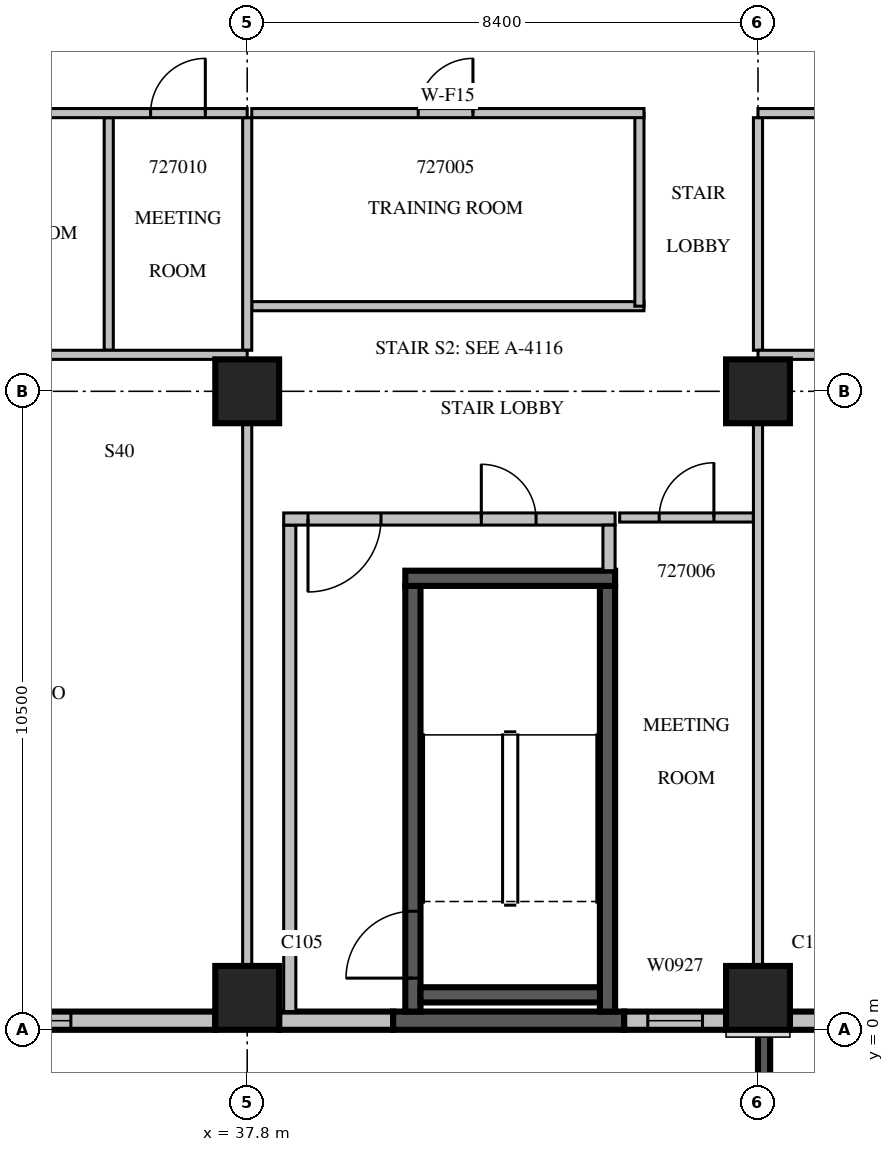
"""IFC4 building model, lengths in metres.
Left out: names, types, materials, properties, quantities, classifications, styles, units other than length and angle.
Written with IfcOpenShell. Run it as: python <this file> out.ifc"""

import sys

from ifc_helpers import new_model, si_unit, direction, frame, frame_2d, origin, origin_2d, place, context, subcontext, project, spatial, rectangle, extrude, source, transform, mapped, element, fill, save


model = new_model("IFC4")
c1 = context("Model", 3, precision=1e-05, world=origin(), true_north=direction((0.0, 1.0)))
c2 = subcontext(c1, "Body", "Model", "MODEL_VIEW")
j1 = project(units=[si_unit("LENGTHUNIT", "METRE"), si_unit("PLANEANGLEUNIT", "RADIAN")], contexts=[c1])
p1 = place(None, origin())
s1 = spatial("IfcSite", under=j1, at=p1, CompositionType="ELEMENT")
p2 = place(p1, origin())
s2 = spatial("IfcBuilding", under=s1, at=p2, CompositionType="ELEMENT")
p3 = place(p2, frame((0.0, 0.0, 124.5)))
s3 = spatial("IfcBuildingStorey", under=s2, at=p3, CompositionType="ELEMENT", Elevation=124.5)
m1 = source(origin(), c2, "Body", "SweptSolid", [
    extrude(rectangle(XDim=1.05, YDim=1.05, at=origin_2d()), origin(), (0.0, 0.0, 1.0), 4.2),
])
for number, where, z_axis, x_axis in (
    (1, (37.8, 0.525, 0.0), (0.0, 0.0, 1.0), (1.0, 0.0, 0.0)),
    (2, (46.2, 0.525, 0.0), (0.0, 0.0, 1.0), (1.0, 0.0, 0.0)),
    (3, (37.8, 10.5, 0.0), (0.0, 0.0, 1.0), (1.0, 0.0, 0.0)),
    (4, (46.2, 10.5, 0.0), (0.0, 0.0, 1.0), (1.0, 0.0, 0.0)),
):
    element("IfcColumn", number, at=place(p3, frame(where, z_axis=z_axis, x_axis=x_axis)), inside=s3, PredefinedType="COLUMN", context=c2, shape_type="MappedRepresentation", body=[
        mapped(m1, transform((0.0, 0.0, 0.0), scale=1.0)),
    ])
m2 = source(origin(), c2, "Body", "SweptSolid", [
    extrude(rectangle(XDim=3.9, YDim=0.2, at=frame_2d((1.95, 0.0))), origin(), (0.0, 0.0, 1.0), 3.8),
])
p4 = place(p3, frame((46.3, 0.0, 0.0), z_axis=(0.0, 0.0, 1.0), x_axis=(0.0, -1.0, 0.0)))
e5 = element("IfcWall", 5, at=p4, inside=s3, PredefinedType="SOLIDWALL", context=c2, shape_type="MappedRepresentation", body=[
    mapped(m2, transform((0.0, 0.0, 0.0), scale=1.0)),
])
m3 = source(origin(), c2, "Body", "SweptSolid", [
    extrude(rectangle(XDim=2.4, YDim=2.7, at=frame_2d((1.2, 1.35))), frame((0.0, 0.11, 0.0), z_axis=(0.0, -1.0, 0.0), x_axis=(1.0, 0.0, 0.0)), (0.0, 0.0, 1.0), 0.22),
])
p5 = place(p4, frame((0.75, 0.0, 0.6)))
e6 = element("IfcOpeningElement", 6, at=p5, cuts=e5, PredefinedType="OPENING", context=c2, shape_type="MappedRepresentation", body=[
    mapped(m3, transform((0.0, 0.0, 0.0), scale=1.0)),
])
m4 = source(origin(), c2, "Body", "SweptSolid", [
    extrude(rectangle(XDim=7.35, YDim=0.3, at=frame_2d((3.675, 0.0))), origin(), (0.0, 0.0, 1.0), 3.8),
])
p6 = place(p3, frame((29.925, 0.15, 0.0), z_axis=(0.0, 0.0, 1.0), x_axis=(1.0, 0.0, 0.0)))
e7 = element("IfcWall", 7, at=p6, inside=s3, PredefinedType="STANDARD", context=c2, shape_type="MappedRepresentation", body=[
    mapped(m4, transform((0.0, 0.0, 0.0), scale=1.0)),
])
m5 = source(origin(), c2, "Body", "SweptSolid", [
    extrude(rectangle(XDim=2.4, YDim=2.7, at=frame_2d((1.2, 1.35))), frame((0.0, 0.16, 0.0), z_axis=(0.0, -1.0, 0.0), x_axis=(1.0, 0.0, 0.0)), (0.0, 0.0, 1.0), 0.32),
])
p7 = place(p6, frame((2.575, 0.0, 0.6)))
e8 = element("IfcOpeningElement", 8, at=p7, cuts=e7, PredefinedType="OPENING", context=c2, shape_type="MappedRepresentation", body=[
    mapped(m5, transform((0.0, 0.0, 0.0), scale=1.0)),
])
m6 = source(origin(), c2, "Body", "SweptSolid", [
    extrude(rectangle(XDim=1.875, YDim=0.3, at=frame_2d((0.938, 0.0))), origin(), (0.0, 0.0, 1.0), 3.8),
])
p8 = place(p3, frame((38.325, 0.15, 0.0), z_axis=(0.0, 0.0, 1.0), x_axis=(1.0, 0.0, 0.0)))
e9 = element("IfcWall", 9, at=p8, inside=s3, PredefinedType="STANDARD", context=c2, shape_type="MappedRepresentation", body=[
    mapped(m6, transform((0.0, 0.0, 0.0), scale=1.0)),
])
m7 = source(origin(), c2, "Body", "SweptSolid", [
    extrude(rectangle(XDim=3.8, YDim=0.3, at=frame_2d((1.9, 0.0))), origin(), (0.0, 0.0, 1.0), 3.8),
])
p9 = place(p3, frame((40.2, 0.15, 0.0), z_axis=(0.0, 0.0, 1.0), x_axis=(1.0, 0.0, 0.0)))
e10 = element("IfcWall", 10, at=p9, inside=s3, PredefinedType="SOLIDWALL", context=c2, shape_type="MappedRepresentation", body=[
    mapped(m7, transform((0.0, 0.0, 0.0), scale=1.0)),
])
m8 = source(origin(), c2, "Body", "SweptSolid", [
    extrude(rectangle(XDim=1.675, YDim=0.3, at=frame_2d((0.838, 0.0))), origin(), (0.0, 0.0, 1.0), 3.8),
])
p10 = place(p3, frame((44.0, 0.15, 0.0), z_axis=(0.0, 0.0, 1.0), x_axis=(1.0, 0.0, 0.0)))
e11 = element("IfcWall", 11, at=p10, inside=s3, PredefinedType="STANDARD", context=c2, shape_type="MappedRepresentation", body=[
    mapped(m8, transform((0.0, 0.0, 0.0), scale=1.0)),
])
m9 = source(origin(), c2, "Body", "SweptSolid", [
    extrude(rectangle(XDim=0.9, YDim=2.7, at=frame_2d((0.45, 1.35))), frame((0.0, 0.16, 0.0), z_axis=(0.0, -1.0, 0.0), x_axis=(1.0, 0.0, 0.0)), (0.0, 0.0, 1.0), 0.32),
])
p11 = place(p10, frame((0.388, 0.0, 0.6)))
e12 = element("IfcOpeningElement", 12, at=p11, cuts=e11, PredefinedType="OPENING", context=c2, shape_type="MappedRepresentation", body=[
    mapped(m9, transform((0.0, 0.0, 0.0), scale=1.0)),
])
m10 = source(origin(), c2, "Body", "SweptSolid", [
    extrude(rectangle(XDim=4.83, YDim=0.3, at=frame_2d((2.415, 0.0))), origin(), (0.0, 0.0, 1.0), 3.8),
])
p12 = place(p3, frame((46.725, 0.15, 0.0), z_axis=(0.0, 0.0, 1.0), x_axis=(1.0, 0.0, 0.0)))
e13 = element("IfcWall", 13, at=p12, inside=s3, PredefinedType="STANDARD", context=c2, shape_type="MappedRepresentation", body=[
    mapped(m10, transform((0.0, 0.0, 0.0), scale=1.0)),
])
m11 = source(origin(), c2, "Body", "SweptSolid", [
    extrude(rectangle(XDim=1.0, YDim=2.1, at=frame_2d((0.5, 1.05))), frame((0.0, 0.16, 0.0), z_axis=(0.0, -1.0, 0.0), x_axis=(1.0, 0.0, 0.0)), (0.0, 0.0, 1.0), 0.32),
])
p13 = place(p12, frame((1.915, 0.0, 0.0)))
e14 = element("IfcOpeningElement", 14, at=p13, cuts=e13, PredefinedType="OPENING", context=c2, shape_type="MappedRepresentation", body=[
    mapped(m11, transform((0.0, 0.0, 0.0), scale=1.0)),
])
m12 = source(origin(), c2, "Body", "SweptSolid", [
    extrude(rectangle(XDim=7.0, YDim=0.25, at=frame_2d((3.5, 0.0))), origin(), (0.0, 0.0, 1.0), 3.8),
])
p14 = place(p3, frame((40.525, 0.3, 0.0), z_axis=(0.0, 0.0, 1.0), x_axis=(0.0, 1.0, 0.0)))
e15 = element("IfcWall", 15, at=p14, inside=s3, PredefinedType="SOLIDWALL", context=c2, shape_type="MappedRepresentation", body=[
    mapped(m12, transform((0.0, 0.0, 0.0), scale=1.0)),
])
m13 = source(origin(), c2, "Body", "SweptSolid", [
    extrude(rectangle(XDim=1.1, YDim=2.1, at=frame_2d((0.55, 1.05))), frame((0.0, 0.135, 0.0), z_axis=(0.0, -1.0, 0.0), x_axis=(1.0, 0.0, 0.0)), (0.0, 0.0, 1.0), 0.27),
])
p15 = place(p14, frame((0.55, 0.0, 0.0)))
e16 = element("IfcOpeningElement", 16, at=p15, cuts=e15, PredefinedType="OPENING", context=c2, shape_type="MappedRepresentation", body=[
    mapped(m13, transform((0.0, 0.0, 0.0), scale=1.0)),
])
p16 = place(p3, frame((43.725, 0.3, 0.0), z_axis=(0.0, 0.0, 1.0), x_axis=(0.0, 1.0, 0.0)))
e17 = element("IfcWall", 17, at=p16, inside=s3, PredefinedType="SOLIDWALL", context=c2, shape_type="MappedRepresentation", body=[
    mapped(m12, transform((0.0, 0.0, 0.0), scale=1.0)),
])
m14 = source(origin(), c2, "Body", "SweptSolid", [
    extrude(rectangle(XDim=3.45, YDim=0.25, at=frame_2d((1.725, 0.0))), origin(), (0.0, 0.0, 1.0), 3.8),
])
p17 = place(p3, frame((40.4, 7.425, 0.0), z_axis=(0.0, 0.0, 1.0), x_axis=(1.0, 0.0, 0.0)))
e18 = element("IfcWall", 18, at=p17, inside=s3, PredefinedType="SOLIDWALL", context=c2, shape_type="MappedRepresentation", body=[
    mapped(m14, transform((0.0, 0.0, 0.0), scale=1.0)),
])
m15 = source(origin(), c2, "Body", "SweptSolid", [
    extrude(rectangle(XDim=2.95, YDim=0.25, at=frame_2d((1.475, 0.0))), origin(), (0.0, 0.0, 1.0), 3.8),
])
p18 = place(p3, frame((40.65, 0.575, 0.0), z_axis=(0.0, 0.0, 1.0), x_axis=(1.0, 0.0, 0.0)))
e19 = element("IfcWall", 19, at=p18, inside=s3, PredefinedType="SOLIDWALL", context=c2, shape_type="MappedRepresentation", body=[
    mapped(m15, transform((0.0, 0.0, 0.0), scale=1.0)),
])
m16 = source(origin(), c2, "Body", "SweptSolid", [
    extrude(rectangle(XDim=8.0, YDim=0.2, at=frame_2d((4.0, 0.0))), origin(), (0.0, 0.0, 1.0), 3.8),
])
p19 = place(p3, frame((38.5, 0.3, 0.0), z_axis=(0.0, 0.0, 1.0), x_axis=(0.0, 1.0, 0.0)))
e20 = element("IfcWall", 20, at=p19, inside=s3, PredefinedType="PARTITIONING", context=c2, shape_type="MappedRepresentation", body=[
    mapped(m16, transform((0.0, 0.0, 0.0), scale=1.0)),
])
m17 = source(origin(), c2, "Body", "SweptSolid", [
    extrude(rectangle(XDim=5.45, YDim=0.2, at=frame_2d((2.725, 0.0))), origin(), (0.0, 0.0, 1.0), 3.8),
])
p20 = place(p3, frame((38.4, 8.4, 0.0), z_axis=(0.0, 0.0, 1.0), x_axis=(1.0, 0.0, 0.0)))
e21 = element("IfcWall", 21, at=p20, inside=s3, PredefinedType="PARTITIONING", context=c2, shape_type="MappedRepresentation", body=[
    mapped(m17, transform((0.0, 0.0, 0.0), scale=1.0)),
])
m18 = source(origin(), c2, "Body", "SweptSolid", [
    extrude(rectangle(XDim=1.2, YDim=2.1, at=frame_2d((0.6, 1.05))), frame((0.0, 0.11, 0.0), z_axis=(0.0, -1.0, 0.0), x_axis=(1.0, 0.0, 0.0)), (0.0, 0.0, 1.0), 0.22),
])
p21 = place(p20, frame((0.4, 0.0, 0.0)))
e22 = element("IfcOpeningElement", 22, at=p21, cuts=e21, PredefinedType="OPENING", context=c2, shape_type="MappedRepresentation", body=[
    mapped(m18, transform((0.0, 0.0, 0.0), scale=1.0)),
])
m19 = source(origin(), c2, "Body", "SweptSolid", [
    extrude(rectangle(XDim=0.9, YDim=2.1, at=frame_2d((0.45, 1.05))), frame((0.0, 0.11, 0.0), z_axis=(0.0, -1.0, 0.0), x_axis=(1.0, 0.0, 0.0)), (0.0, 0.0, 1.0), 0.22),
])
p22 = place(p20, frame((3.25, 0.0, 0.0)))
e23 = element("IfcOpeningElement", 23, at=p22, cuts=e21, PredefinedType="OPENING", context=c2, shape_type="MappedRepresentation", body=[
    mapped(m19, transform((0.0, 0.0, 0.0), scale=1.0)),
])
m20 = source(origin(), c2, "Body", "SweptSolid", [
    extrude(rectangle(XDim=0.75, YDim=0.2, at=frame_2d((0.375, 0.0))), origin(), (0.0, 0.0, 1.0), 3.8),
])
p23 = place(p3, frame((43.75, 7.55, 0.0), z_axis=(0.0, 0.0, 1.0), x_axis=(0.0, 1.0, 0.0)))
e24 = element("IfcWall", 24, at=p23, inside=s3, PredefinedType="PARTITIONING", context=c2, shape_type="MappedRepresentation", body=[
    mapped(m20, transform((0.0, 0.0, 0.0), scale=1.0)),
])
m21 = source(origin(), c2, "Body", "SweptSolid", [
    extrude(rectangle(XDim=6.45, YDim=0.15, at=frame_2d((3.225, 0.0))), origin(), (0.0, 0.0, 1.0), 3.8),
])
p24 = place(p3, frame((37.875, 11.9, 0.0), z_axis=(0.0, 0.0, 1.0), x_axis=(1.0, 0.0, 0.0)))
e25 = element("IfcWall", 25, at=p24, inside=s3, PredefinedType="PARTITIONING", context=c2, shape_type="MappedRepresentation", body=[
    mapped(m21, transform((0.0, 0.0, 0.0), scale=1.0)),
])
m22 = source(origin(), c2, "Body", "SweptSolid", [
    extrude(rectangle(XDim=3.175, YDim=0.15, at=frame_2d((1.587, 0.0))), origin(), (0.0, 0.0, 1.0), 3.8),
])
p25 = place(p3, frame((44.25, 11.9, 0.0), z_axis=(0.0, 0.0, 1.0), x_axis=(0.0, 1.0, 0.0)))
e26 = element("IfcWall", 26, at=p25, inside=s3, PredefinedType="PARTITIONING", context=c2, shape_type="MappedRepresentation", body=[
    mapped(m22, transform((0.0, 0.0, 0.0), scale=1.0)),
])
p26 = place(p3, frame((44.325, 15.075, 0.0), z_axis=(0.0, 0.0, 1.0), x_axis=(-1.0, 0.0, 0.0)))
e27 = element("IfcWall", 27, at=p26, inside=s3, PredefinedType="PARTITIONING", context=c2, shape_type="MappedRepresentation", body=[
    mapped(m21, transform((0.0, 0.0, 0.0), scale=1.0)),
])
m23 = source(origin(), c2, "Body", "SweptSolid", [
    extrude(rectangle(XDim=0.9, YDim=2.1, at=frame_2d((0.45, 1.05))), frame((0.0, 0.085, 0.0), z_axis=(0.0, -1.0, 0.0), x_axis=(1.0, 0.0, 0.0)), (0.0, 0.0, 1.0), 0.17),
])
p27 = place(p26, frame((2.812, 0.0, 0.0)))
e28 = element("IfcOpeningElement", 28, at=p27, cuts=e27, PredefinedType="OPENING", context=c2, shape_type="MappedRepresentation", body=[
    mapped(m23, transform((0.0, 0.0, 0.0), scale=1.0)),
])
m24 = source(origin(), c2, "Body", "SweptSolid", [
    extrude(rectangle(XDim=2.2, YDim=0.15, at=frame_2d((1.1, 0.0))), origin(), (0.0, 0.0, 1.0), 3.8),
])
p28 = place(p3, frame((46.125, 8.425, 0.0), z_axis=(0.0, 0.0, 1.0), x_axis=(-1.0, 0.0, 0.0)))
e29 = element("IfcWall", 29, at=p28, inside=s3, PredefinedType="PARTITIONING", context=c2, shape_type="MappedRepresentation", body=[
    mapped(m24, transform((0.0, 0.0, 0.0), scale=1.0)),
])
p29 = place(p28, frame((0.65, 0.0, 0.0)))
e30 = element("IfcOpeningElement", 30, at=p29, cuts=e29, PredefinedType="OPENING", context=c2, shape_type="MappedRepresentation", body=[
    mapped(m23, transform((0.0, 0.0, 0.0), scale=1.0)),
])
m25 = source(origin(), c2, "Body", "SweptSolid", [
    extrude(rectangle(XDim=3.825, YDim=0.15, at=frame_2d((1.913, 0.0))), origin(), (0.0, 0.0, 1.0), 3.8),
])
p30 = place(p3, frame((35.523, 11.175, 0.0), z_axis=(0.0, 0.0, 1.0), x_axis=(0.0, 1.0, 0.0)))
e31 = element("IfcWall", 31, at=p30, inside=s3, PredefinedType="PARTITIONING", context=c2, shape_type="MappedRepresentation", body=[
    mapped(m25, transform((0.0, 0.0, 0.0), scale=1.0)),
])
m26 = source(origin(), c2, "Body", "SweptSolid", [
    extrude(rectangle(XDim=8.927, YDim=0.15, at=frame_2d((4.463, 0.0))), origin(), (0.0, 0.0, 1.0), 3.8),
])
p31 = place(p3, frame((37.8, 1.049, 0.0), z_axis=(0.0, 0.0, 1.0), x_axis=(0.0, 1.0, 0.0)))
e32 = element("IfcWall", 32, at=p31, inside=s3, PredefinedType="PARTITIONING", context=c2, shape_type="MappedRepresentation", body=[
    mapped(m26, transform((0.0, 0.0, 0.0), scale=1.0)),
])
p32 = place(p3, frame((37.8, 11.175, 0.0), z_axis=(0.0, 0.0, 1.0), x_axis=(0.0, 1.0, 0.0)))
e33 = element("IfcWall", 33, at=p32, inside=s3, PredefinedType="PARTITIONING", context=c2, shape_type="MappedRepresentation", body=[
    mapped(m25, transform((0.0, 0.0, 0.0), scale=1.0)),
])
m27 = source(origin(), c2, "Body", "SweptSolid", [
    extrude(rectangle(XDim=8.4, YDim=0.15, at=frame_2d((4.2, 0.0))), origin(), (0.0, 0.0, 1.0), 3.8),
])
p33 = place(p3, frame((37.8, 11.1, 0.0), z_axis=(0.0, 0.0, 1.0), x_axis=(-1.0, 0.0, 0.0)))
e34 = element("IfcWall", 34, at=p33, inside=s3, PredefinedType="PARTITIONING", context=c2, shape_type="MappedRepresentation", body=[
    mapped(m27, transform((0.0, 0.0, 0.0), scale=1.0)),
])
m28 = source(origin(), c2, "Body", "SweptSolid", [
    extrude(rectangle(XDim=1.1, YDim=2.1, at=frame_2d((0.55, 1.05))), frame((0.0, 0.085, 0.0), z_axis=(0.0, -1.0, 0.0), x_axis=(1.0, 0.0, 0.0)), (0.0, 0.0, 1.0), 0.17),
])
p34 = place(p33, frame((5.999, 0.0, 0.0)))
e35 = element("IfcOpeningElement", 35, at=p34, cuts=e34, PredefinedType="OPENING", context=c2, shape_type="MappedRepresentation", body=[
    mapped(m28, transform((0.0, 0.0, 0.0), scale=1.0)),
])
p35 = place(p3, frame((46.2, 1.049, 0.0), z_axis=(0.0, 0.0, 1.0), x_axis=(0.0, 1.0, 0.0)))
e36 = element("IfcWall", 36, at=p35, inside=s3, PredefinedType="PARTITIONING", context=c2, shape_type="MappedRepresentation", body=[
    mapped(m26, transform((0.0, 0.0, 0.0), scale=1.0)),
])
p36 = place(p3, frame((46.2, 11.175, 0.0), z_axis=(0.0, 0.0, 1.0), x_axis=(0.0, 1.0, 0.0)))
e37 = element("IfcWall", 37, at=p36, inside=s3, PredefinedType="PARTITIONING", context=c2, shape_type="MappedRepresentation", body=[
    mapped(m25, transform((0.0, 0.0, 0.0), scale=1.0)),
])
m29 = source(origin(), c2, "Body", "SweptSolid", [
    extrude(rectangle(XDim=24.9, YDim=0.15, at=frame_2d((12.45, 0.0))), origin(), (0.0, 0.0, 1.0), 3.8),
])
p37 = place(p3, frame((71.1, 11.1, 0.0), z_axis=(0.0, 0.0, 1.0), x_axis=(-1.0, 0.0, 0.0)))
e38 = element("IfcWall", 38, at=p37, inside=s3, PredefinedType="PARTITIONING", context=c2, shape_type="MappedRepresentation", body=[
    mapped(m29, transform((0.0, 0.0, 0.0), scale=1.0)),
])
p38 = place(p37, frame((21.51, 0.0, 0.0)))
e39 = element("IfcOpeningElement", 39, at=p38, cuts=e38, PredefinedType="OPENING", context=c2, shape_type="MappedRepresentation", body=[
    mapped(m23, transform((0.0, 0.0, 0.0), scale=1.0)),
])
p39 = place(p37, frame((15.63, 0.0, 0.0)))
e40 = element("IfcOpeningElement", 40, at=p39, cuts=e38, PredefinedType="OPENING", context=c2, shape_type="MappedRepresentation", body=[
    mapped(m23, transform((0.0, 0.0, 0.0), scale=1.0)),
])
p40 = place(p37, frame((9.75, 0.0, 0.0)))
e41 = element("IfcOpeningElement", 41, at=p40, cuts=e38, PredefinedType="OPENING", context=c2, shape_type="MappedRepresentation", body=[
    mapped(m23, transform((0.0, 0.0, 0.0), scale=1.0)),
])
p41 = place(p37, frame((4.645, 0.0, 0.0)))
e42 = element("IfcOpeningElement", 42, at=p41, cuts=e38, PredefinedType="OPENING", context=c2, shape_type="MappedRepresentation", body=[
    mapped(m23, transform((0.0, 0.0, 0.0), scale=1.0)),
])
p42 = place(p37, frame((2.105, 0.0, 0.0)))
e43 = element("IfcOpeningElement", 43, at=p42, cuts=e38, PredefinedType="OPENING", context=c2, shape_type="MappedRepresentation", body=[
    mapped(m28, transform((0.0, 0.0, 0.0), scale=1.0)),
])
p43 = place(p3, frame((37.8, 15.075, 0.0), z_axis=(0.0, 0.0, 1.0), x_axis=(-1.0, 0.0, 0.0)))
e44 = element("IfcWall", 44, at=p43, inside=s3, PredefinedType="PARTITIONING", context=c2, shape_type="MappedRepresentation", body=[
    mapped(m27, transform((0.0, 0.0, 0.0), scale=1.0)),
])
p44 = place(p43, frame((6.274, 0.0, 0.0)))
e45 = element("IfcOpeningElement", 45, at=p44, cuts=e44, PredefinedType="OPENING", context=c2, shape_type="MappedRepresentation", body=[
    mapped(m28, transform((0.0, 0.0, 0.0), scale=1.0)),
])
p45 = place(p43, frame((3.313, 0.0, 0.0)))
e46 = element("IfcOpeningElement", 46, at=p45, cuts=e44, PredefinedType="OPENING", context=c2, shape_type="MappedRepresentation", body=[
    mapped(m23, transform((0.0, 0.0, 0.0), scale=1.0)),
])
p46 = place(p43, frame((0.689, 0.0, 0.0)))
e47 = element("IfcOpeningElement", 47, at=p46, cuts=e44, PredefinedType="OPENING", context=c2, shape_type="MappedRepresentation", body=[
    mapped(m23, transform((0.0, 0.0, 0.0), scale=1.0)),
])
p47 = place(p3, frame((71.1, 15.075, 0.0), z_axis=(0.0, 0.0, 1.0), x_axis=(-1.0, 0.0, 0.0)))
e48 = element("IfcWall", 48, at=p47, inside=s3, PredefinedType="PARTITIONING", context=c2, shape_type="MappedRepresentation", body=[
    mapped(m29, transform((0.0, 0.0, 0.0), scale=1.0)),
])
m30 = source(origin(), c2, "Body", "SweptSolid", [
    extrude(rectangle(XDim=1.2, YDim=2.1, at=frame_2d((0.6, 1.05))), frame((0.0, 0.085, 0.0), z_axis=(0.0, -1.0, 0.0), x_axis=(1.0, 0.0, 0.0)), (0.0, 0.0, 1.0), 0.17),
])
p48 = place(p47, frame((13.59, 0.0, 0.0)))
e49 = element("IfcOpeningElement", 49, at=p48, cuts=e48, PredefinedType="OPENING", context=c2, shape_type="MappedRepresentation", body=[
    mapped(m30, transform((0.0, 0.0, 0.0), scale=1.0)),
])
p49 = place(p47, frame((1.153, 0.0, 0.0)))
e50 = element("IfcOpeningElement", 50, at=p49, cuts=e48, PredefinedType="OPENING", context=c2, shape_type="MappedRepresentation", body=[
    mapped(m28, transform((0.0, 0.0, 0.0), scale=1.0)),
])
m31 = source(origin(), c2, "Body", "SweptSolid", [
    extrude(rectangle(XDim=2.4, YDim=2.7, at=frame_2d((1.2, 1.35))), frame((0.0, 0.03, 0.0), z_axis=(0.0, -1.0, 0.0), x_axis=(1.0, 0.0, 0.0)), (0.0, 0.0, 1.0), 0.06),
])
p50 = place(p7, origin())
e51 = element("IfcWindow", 51, at=p50, inside=s3, PartitioningType="SINGLE_PANEL", PredefinedType="WINDOW", context=c2, shape_type="MappedRepresentation", body=[
    mapped(m31, transform((0.0, 0.0, 0.0), scale=1.0)),
])
fill(e8, e51)
m32 = source(origin(), c2, "Body", "SweptSolid", [
    extrude(rectangle(XDim=0.9, YDim=2.7, at=frame_2d((0.45, 1.35))), frame((0.0, 0.03, 0.0), z_axis=(0.0, -1.0, 0.0), x_axis=(1.0, 0.0, 0.0)), (0.0, 0.0, 1.0), 0.06),
])
p51 = place(p11, origin())
e52 = element("IfcWindow", 52, at=p51, inside=s3, PartitioningType="SINGLE_PANEL", PredefinedType="WINDOW", context=c2, shape_type="MappedRepresentation", body=[
    mapped(m32, transform((0.0, 0.0, 0.0), scale=1.0)),
])
fill(e12, e52)
m33 = source(origin(), c2, "Body", "SweptSolid", [
    extrude(rectangle(XDim=1.1, YDim=2.1, at=frame_2d((0.55, 1.05))), frame((0.0, 0.025, 0.0), z_axis=(0.0, -1.0, 0.0), x_axis=(1.0, 0.0, 0.0)), (0.0, 0.0, 1.0), 0.05),
])
p52 = place(p15, origin())
e53 = element("IfcDoor", 53, at=p52, inside=s3, OperationType="SINGLE_SWING_LEFT", PredefinedType="DOOR", context=c2, shape_type="MappedRepresentation", body=[
    mapped(m33, transform((0.0, 0.0, 0.0), scale=1.0)),
])
fill(e16, e53)
m34 = source(origin(), c2, "Body", "SweptSolid", [
    extrude(rectangle(XDim=1.2, YDim=2.1, at=frame_2d((0.6, 1.05))), frame((0.0, 0.025, 0.0), z_axis=(0.0, -1.0, 0.0), x_axis=(1.0, 0.0, 0.0)), (0.0, 0.0, 1.0), 0.05),
])
p53 = place(p21, origin())
e54 = element("IfcDoor", 54, at=p53, inside=s3, OperationType="SINGLE_SWING_RIGHT", PredefinedType="DOOR", context=c2, shape_type="MappedRepresentation", body=[
    mapped(m34, transform((0.0, 0.0, 0.0), scale=1.0)),
])
fill(e22, e54)
m35 = source(origin(), c2, "Body", "SweptSolid", [
    extrude(rectangle(XDim=0.9, YDim=2.1, at=frame_2d((0.45, 1.05))), frame((0.0, 0.025, 0.0), z_axis=(0.0, -1.0, 0.0), x_axis=(1.0, 0.0, 0.0)), (0.0, 0.0, 1.0), 0.05),
])
p54 = place(p22, origin())
e55 = element("IfcDoor", 55, at=p54, inside=s3, OperationType="SINGLE_SWING_LEFT", PredefinedType="DOOR", context=c2, shape_type="MappedRepresentation", body=[
    mapped(m35, transform((0.0, 0.0, 0.0), scale=1.0)),
])
fill(e23, e55)
p55 = place(p27, origin())
e56 = element("IfcDoor", 56, at=p55, inside=s3, OperationType="SINGLE_SWING_RIGHT", PredefinedType="DOOR", context=c2, shape_type="MappedRepresentation", body=[
    mapped(m35, transform((0.0, 0.0, 0.0), scale=1.0)),
])
fill(e28, e56)
p56 = place(p29, origin())
e57 = element("IfcDoor", 57, at=p56, inside=s3, OperationType="SINGLE_SWING_RIGHT", PredefinedType="DOOR", context=c2, shape_type="MappedRepresentation", body=[
    mapped(m35, transform((0.0, 0.0, 0.0), scale=1.0)),
])
fill(e30, e57)
p57 = place(p46, origin())
e58 = element("IfcDoor", 58, at=p57, inside=s3, OperationType="SINGLE_SWING_RIGHT", PredefinedType="DOOR", context=c2, shape_type="MappedRepresentation", body=[
    mapped(m35, transform((0.0, 0.0, 0.0), scale=1.0)),
])
fill(e47, e58)
save(model, sys.argv[1])
